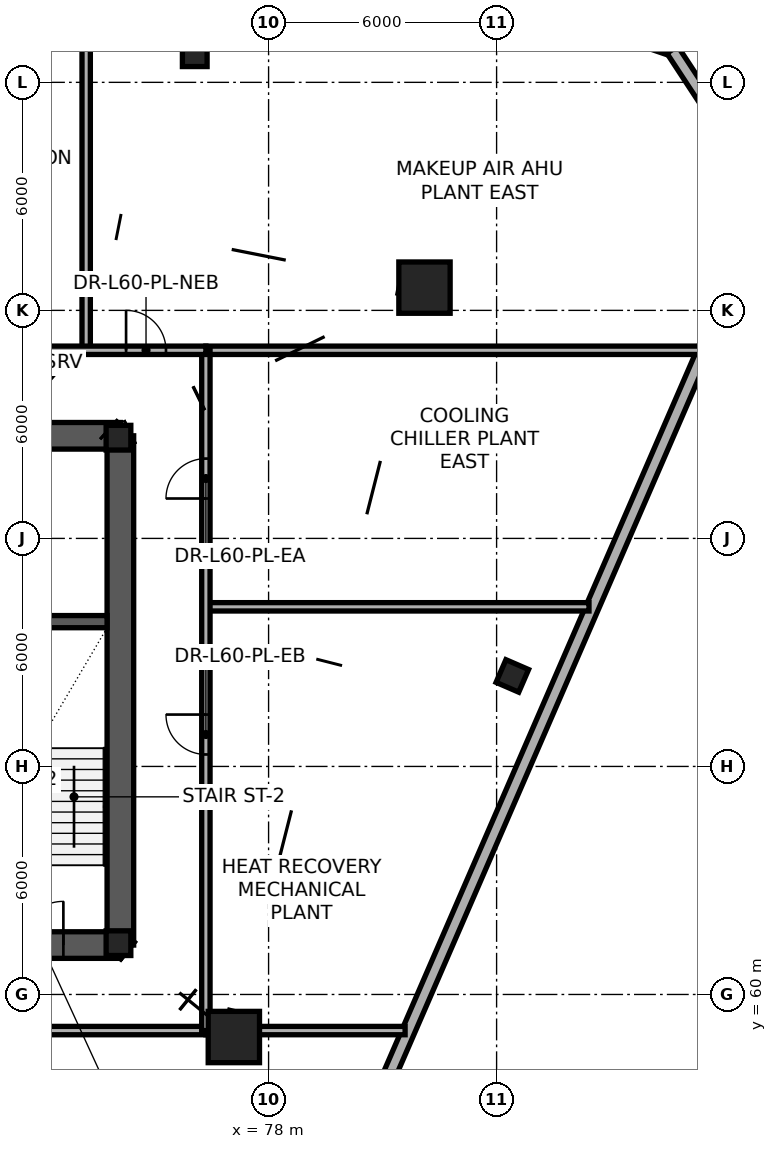
"""IFC4 building model, lengths in metres.
Left out: names, types, materials, properties, quantities, classifications, styles, units other than length and angle.
Written with IfcOpenShell. Run it as: python <this file> out.ifc"""

import sys

from ifc_helpers import new_model, si_unit, direction, frame, frame_2d, origin, origin_2d, place, context, subcontext, project, spatial, rectangle, extrude, element, fill, save


model = new_model("IFC4")
c1 = context("Model", 3, precision=1e-05, world=origin(), true_north=direction((0.0, 1.0)))
c2 = subcontext(c1, "Body", "Model", "MODEL_VIEW")
j1 = project(units=[si_unit("LENGTHUNIT", "METRE"), si_unit("PLANEANGLEUNIT", "RADIAN")], contexts=[c1])
p1 = place(None, origin())
s1 = spatial("IfcSite", under=j1, at=p1, CompositionType="ELEMENT")
p2 = place(p1, origin())
s2 = spatial("IfcBuilding", under=s1, at=p2, CompositionType="ELEMENT")
p3 = place(p2, frame((0.0, 0.0, 227.4)))
s3 = spatial("IfcBuildingStorey", under=s2, at=p3, CompositionType="ELEMENT", Elevation=227.4)
p4 = place(p3, frame((57.9, 61.3, 0.0), z_axis=(0.0, 0.0, 1.0), x_axis=(1.0, 0.0, 0.0)))
e1 = element("IfcWall", 1, at=p4, inside=s3, PredefinedType="SHEAR", context=c2, shape_type="SweptSolid", body=[
    extrude(rectangle(XDim=16.2, YDim=0.7, at=frame_2d((8.1, 0.0))), origin(), (0.0, 0.0, 1.0), 4.2),
])
p5 = place(p4, frame((1.35, 0.0, 0.0)))
e2 = element("IfcOpeningElement", 2, at=p5, cuts=e1, PredefinedType="OPENING", context=c2, shape_type="SweptSolid", body=[
    extrude(rectangle(XDim=1.15, YDim=2.15, at=frame_2d((0.575, 1.075))), frame((0.0, 0.36, 0.0), z_axis=(0.0, -1.0, 0.0), x_axis=(1.0, 0.0, 0.0)), (0.0, 0.0, 1.0), 0.72),
])
p6 = place(p4, frame((6.1, 0.0, 0.0)))
e3 = element("IfcOpeningElement", 3, at=p6, cuts=e1, PredefinedType="OPENING", context=c2, shape_type="SweptSolid", body=[
    extrude(rectangle(XDim=1.6, YDim=2.15, at=frame_2d((0.8, 1.075))), frame((0.0, 0.36, 0.0), z_axis=(0.0, -1.0, 0.0), x_axis=(1.0, 0.0, 0.0)), (0.0, 0.0, 1.0), 0.72),
])
p7 = place(p4, frame((13.55, 0.0, 0.0)))
e4 = element("IfcOpeningElement", 4, at=p7, cuts=e1, PredefinedType="OPENING", context=c2, shape_type="SweptSolid", body=[
    extrude(rectangle(XDim=1.15, YDim=2.15, at=frame_2d((0.575, 1.075))), frame((0.0, 0.36, 0.0), z_axis=(0.0, -1.0, 0.0), x_axis=(1.0, 0.0, 0.0)), (0.0, 0.0, 1.0), 0.72),
])
p8 = place(p3, frame((74.1, 61.3, 0.0), z_axis=(0.0, 0.0, 1.0), x_axis=(0.0, 1.0, 0.0)))
e5 = element("IfcWall", 5, at=p8, inside=s3, PredefinedType="SHEAR", context=c2, shape_type="SweptSolid", body=[
    extrude(rectangle(XDim=13.4, YDim=0.7, at=frame_2d((6.7, 0.0))), origin(), (0.0, 0.0, 1.0), 4.2),
])
p9 = place(p3, frame((74.1, 74.7, 0.0), z_axis=(0.0, 0.0, 1.0), x_axis=(-1.0, 0.0, 0.0)))
e6 = element("IfcWall", 6, at=p9, inside=s3, PredefinedType="SHEAR", context=c2, shape_type="SweptSolid", body=[
    extrude(rectangle(XDim=7.25, YDim=0.7, at=frame_2d((3.625, 0.0))), origin(), (0.0, 0.0, 1.0), 4.2),
])
p10 = place(p3, frame((69.91, 69.81, 0.0), z_axis=(0.0, 0.0, 1.0), x_axis=(1.0, 0.0, 0.0)))
e7 = element("IfcWall", 7, at=p10, inside=s3, PredefinedType="SHEAR", context=c2, shape_type="SweptSolid", body=[
    extrude(rectangle(XDim=3.84, YDim=0.32, at=frame_2d((1.92, 0.0))), origin(), (0.0, 0.0, 1.0), 4.2),
])
for number, where, z_axis, x_axis in (
    (8, (74.05, 61.35, 0.0), (0.0, 0.0, 1.0), (1.0, 0.0, 0.0)),
    (9, (74.05, 74.65, 0.0), (0.0, 0.0, 1.0), (1.0, 0.0, 0.0)),
):
    element("IfcColumn", number, at=place(p3, frame(where, z_axis=z_axis, x_axis=x_axis)), inside=s3, PredefinedType="COLUMN", context=c2, shape_type="SweptSolid", body=[
        extrude(rectangle(XDim=0.65, YDim=0.65, at=origin_2d()), origin(), (0.0, 0.0, 1.0), 4.2),
    ])
for number, where, z_axis, x_axis in (
    (10, (82.102, 78.599, 0.0), (0.0, 0.0, 1.0), (1.0, 0.0, 0.0)),
    (11, (77.086, 58.88, 0.0), (0.0, 0.0, 1.0), (1.0, 0.0, 0.0)),
):
    element("IfcColumn", number, at=place(p3, frame(where, z_axis=z_axis, x_axis=x_axis)), inside=s3, PredefinedType="COLUMN", context=c2, shape_type="SweptSolid", body=[
        extrude(rectangle(XDim=1.35, YDim=1.35, at=origin_2d()), origin(), (0.0, 0.0, 1.0), 4.2),
    ])
p11 = place(p3, frame((84.486, 68.392, 0.003), z_axis=(-0.034093161736, -0.004887074379, 0.999406710417), x_axis=(0.964007058955, -0.263992744095, 0.031594641171)))
e12 = element("IfcColumn", 12, at=p11, inside=s3, PredefinedType="COLUMN", context=c2, shape_type="SweptSolid", body=[
    extrude(rectangle(XDim=0.65, YDim=0.65, at=origin_2d()), origin(), (0.0, 0.0, 1.0), 4.196),
])
p12 = place(p3, frame((76.106, 84.802, 0.003), z_axis=(-0.023327540233, -0.029144881937, 0.999302957928), x_axis=(-0.780716755404, 0.624885067698, 0.0)))
e13 = element("IfcColumn", 13, at=p12, inside=s3, PredefinedType="COLUMN", context=c2, shape_type="SweptSolid", body=[
    extrude(rectangle(XDim=0.65, YDim=0.65, at=origin_2d()), origin(), (0.0, 0.0, 1.0), 4.197),
])
p13 = place(p3, frame((85.435, 85.951, 0.0), z_axis=(0.0, 0.0, 1.0), x_axis=(0.946036065973, -0.324061355115, 0.0)))
e14 = element("IfcWall", 14, at=p13, inside=s3, PredefinedType="STANDARD", context=c2, shape_type="SweptSolid", body=[
    extrude(rectangle(XDim=3.371, YDim=0.34, at=frame_2d((1.685, 0.0))), origin(), (0.0, 0.0, 1.0), 3.95),
])
p14 = place(p3, frame((88.623, 84.859, 0.0), z_axis=(0.0, 0.0, 1.0), x_axis=(0.54858365387, -0.836095673177, 0.0)))
e15 = element("IfcWall", 15, at=p14, inside=s3, PredefinedType="STANDARD", context=c2, shape_type="SweptSolid", body=[
    extrude(rectangle(XDim=3.37, YDim=0.34, at=frame_2d((1.685, 0.0))), origin(), (0.0, 0.0, 1.0), 3.95),
])
p15 = place(p3, frame((90.205, 78.681, 0.0), z_axis=(0.0, 0.0, 1.0), x_axis=(-0.398111937444, -0.917336843948, 0.0)))
e16 = element("IfcWall", 16, at=p15, inside=s3, PredefinedType="STANDARD", context=c2, shape_type="SweptSolid", body=[
    extrude(rectangle(XDim=48.817, YDim=0.34, at=frame_2d((24.408, 0.0))), origin(), (0.0, 0.0, 1.0), 0.85),
])
p16 = place(p3, frame((73.2, 76.95, 0.0), z_axis=(0.0, 0.0, 1.0), x_axis=(0.0, 1.0, 0.0)))
e17 = element("IfcWall", 17, at=p16, inside=s3, PredefinedType="PARTITIONING", context=c2, shape_type="SweptSolid", body=[
    extrude(rectangle(XDim=8.917, YDim=0.22, at=frame_2d((4.458, 0.0))), origin(), (0.0, 0.0, 1.0), 3.15),
])
p17 = place(p3, frame((76.35, 76.95, 0.0), z_axis=(0.0, 0.0, 1.0), x_axis=(1.0, 0.0, 0.0)))
e18 = element("IfcWall", 18, at=p17, inside=s3, PredefinedType="PARTITIONING", context=c2, shape_type="SweptSolid", body=[
    extrude(rectangle(XDim=13.011, YDim=0.22, at=frame_2d((6.505, 0.0))), origin(), (0.0, 0.0, 1.0), 3.15),
])
p18 = place(p3, frame((76.35, 70.2, 0.0), z_axis=(0.0, 0.0, 1.0), x_axis=(1.0, 0.0, 0.0)))
e19 = element("IfcWall", 19, at=p18, inside=s3, PredefinedType="PARTITIONING", context=c2, shape_type="SweptSolid", body=[
    extrude(rectangle(XDim=10.081, YDim=0.22, at=frame_2d((5.041, 0.0))), origin(), (0.0, 0.0, 1.0), 3.15),
])
p19 = place(p3, frame((76.35, 59.05, 0.0), z_axis=(0.0, 0.0, 1.0), x_axis=(1.0, 0.0, 0.0)))
e20 = element("IfcWall", 20, at=p19, inside=s3, PredefinedType="PARTITIONING", context=c2, shape_type="SweptSolid", body=[
    extrude(rectangle(XDim=5.242, YDim=0.22, at=frame_2d((2.621, 0.0))), origin(), (0.0, 0.0, 1.0), 3.15),
])
p20 = place(p3, frame((55.65, 59.05, 0.0), z_axis=(0.0, 0.0, 1.0), x_axis=(1.0, 0.0, 0.0)))
e21 = element("IfcWall", 21, at=p20, inside=s3, PredefinedType="PARTITIONING", context=c2, shape_type="SweptSolid", body=[
    extrude(rectangle(XDim=20.7, YDim=0.22, at=frame_2d((10.35, 0.0))), origin(), (0.0, 0.0, 1.0), 3.38),
])
p21 = place(p20, frame((9.6, 0.0, 0.0)))
e22 = element("IfcOpeningElement", 22, at=p21, cuts=e21, PredefinedType="OPENING", context=c2, shape_type="SweptSolid", body=[
    extrude(rectangle(XDim=1.5, YDim=2.2, at=frame_2d((0.75, 1.1))), frame((0.0, 0.12, 0.0), z_axis=(0.0, -1.0, 0.0), x_axis=(1.0, 0.0, 0.0)), (0.0, 0.0, 1.0), 0.24),
])
p22 = place(p3, frame((76.35, 59.05, 0.0), z_axis=(0.0, 0.0, 1.0), x_axis=(0.0, 1.0, 0.0)))
e23 = element("IfcWall", 23, at=p22, inside=s3, PredefinedType="PARTITIONING", context=c2, shape_type="SweptSolid", body=[
    extrude(rectangle(XDim=17.9, YDim=0.22, at=frame_2d((8.95, 0.0))), origin(), (0.0, 0.0, 1.0), 3.38),
])
p23 = place(p22, frame((7.265, 0.0, 0.0)))
e24 = element("IfcOpeningElement", 24, at=p23, cuts=e23, PredefinedType="OPENING", context=c2, shape_type="SweptSolid", body=[
    extrude(rectangle(XDim=1.05, YDim=2.15, at=frame_2d((0.525, 1.075))), frame((0.0, 0.12, 0.0), z_axis=(0.0, -1.0, 0.0), x_axis=(1.0, 0.0, 0.0)), (0.0, 0.0, 1.0), 0.24),
])
p24 = place(p22, frame((14.0, 0.0, 0.0)))
e25 = element("IfcOpeningElement", 25, at=p24, cuts=e23, PredefinedType="OPENING", context=c2, shape_type="SweptSolid", body=[
    extrude(rectangle(XDim=1.05, YDim=2.15, at=frame_2d((0.525, 1.075))), frame((0.0, 0.12, 0.0), z_axis=(0.0, -1.0, 0.0), x_axis=(1.0, 0.0, 0.0)), (0.0, 0.0, 1.0), 0.24),
])
p25 = place(p3, frame((55.65, 76.95, 0.0), z_axis=(0.0, 0.0, 1.0), x_axis=(1.0, 0.0, 0.0)))
e26 = element("IfcWall", 26, at=p25, inside=s3, PredefinedType="PARTITIONING", context=c2, shape_type="SweptSolid", body=[
    extrude(rectangle(XDim=20.7, YDim=0.22, at=frame_2d((10.35, 0.0))), origin(), (0.0, 0.0, 1.0), 3.38),
])
p26 = place(p25, frame((1.15, 0.0, 0.0)))
e27 = element("IfcOpeningElement", 27, at=p26, cuts=e26, PredefinedType="OPENING", context=c2, shape_type="SweptSolid", body=[
    extrude(rectangle(XDim=1.05, YDim=2.15, at=frame_2d((0.525, 1.075))), frame((0.0, 0.12, 0.0), z_axis=(0.0, -1.0, 0.0), x_axis=(1.0, 0.0, 0.0)), (0.0, 0.0, 1.0), 0.24),
])
p27 = place(p25, frame((6.325, 0.0, 0.0)))
e28 = element("IfcOpeningElement", 28, at=p27, cuts=e26, PredefinedType="OPENING", context=c2, shape_type="SweptSolid", body=[
    extrude(rectangle(XDim=1.05, YDim=2.15, at=frame_2d((0.525, 1.075))), frame((0.0, 0.12, 0.0), z_axis=(0.0, -1.0, 0.0), x_axis=(1.0, 0.0, 0.0)), (0.0, 0.0, 1.0), 0.24),
])
p28 = place(p25, frame((11.602, 0.0, 0.0)))
e29 = element("IfcOpeningElement", 29, at=p28, cuts=e26, PredefinedType="OPENING", context=c2, shape_type="SweptSolid", body=[
    extrude(rectangle(XDim=1.05, YDim=2.15, at=frame_2d((0.525, 1.075))), frame((0.0, 0.12, 0.0), z_axis=(0.0, -1.0, 0.0), x_axis=(1.0, 0.0, 0.0)), (0.0, 0.0, 1.0), 0.24),
])
p29 = place(p25, frame((18.6, 0.0, 0.0)))
e30 = element("IfcOpeningElement", 30, at=p29, cuts=e26, PredefinedType="OPENING", context=c2, shape_type="SweptSolid", body=[
    extrude(rectangle(XDim=1.05, YDim=2.15, at=frame_2d((0.525, 1.075))), frame((0.0, 0.12, 0.0), z_axis=(0.0, -1.0, 0.0), x_axis=(1.0, 0.0, 0.0)), (0.0, 0.0, 1.0), 0.24),
])
p30 = place(p7, origin())
e31 = element("IfcDoor", 31, at=p30, inside=s3, OperationType="SINGLE_SWING_RIGHT", PredefinedType="DOOR", context=c2, shape_type="SweptSolid", body=[
    extrude(rectangle(XDim=1.15, YDim=2.15, at=frame_2d((0.575, 1.075))), frame((0.0, 0.025, 0.0), z_axis=(0.0, -1.0, 0.0), x_axis=(1.0, 0.0, 0.0)), (0.0, 0.0, 1.0), 0.05),
])
fill(e4, e31)
p31 = place(p23, origin())
e32 = element("IfcDoor", 32, at=p31, inside=s3, OperationType="SINGLE_SWING_RIGHT", PredefinedType="DOOR", context=c2, shape_type="SweptSolid", body=[
    extrude(rectangle(XDim=1.05, YDim=2.15, at=frame_2d((0.525, 1.075))), frame((0.0, 0.025, 0.0), z_axis=(0.0, -1.0, 0.0), x_axis=(1.0, 0.0, 0.0)), (0.0, 0.0, 1.0), 0.05),
])
fill(e24, e32)
p32 = place(p24, origin())
e33 = element("IfcDoor", 33, at=p32, inside=s3, OperationType="SINGLE_SWING_LEFT", PredefinedType="DOOR", context=c2, shape_type="SweptSolid", body=[
    extrude(rectangle(XDim=1.05, YDim=2.15, at=frame_2d((0.525, 1.075))), frame((0.0, 0.025, 0.0), z_axis=(0.0, -1.0, 0.0), x_axis=(1.0, 0.0, 0.0)), (0.0, 0.0, 1.0), 0.05),
])
fill(e25, e33)
p33 = place(p29, origin())
e34 = element("IfcDoor", 34, at=p33, inside=s3, OperationType="SINGLE_SWING_LEFT", PredefinedType="DOOR", context=c2, shape_type="SweptSolid", body=[
    extrude(rectangle(XDim=1.05, YDim=2.15, at=frame_2d((0.525, 1.075))), frame((0.0, 0.025, 0.0), z_axis=(0.0, -1.0, 0.0), x_axis=(1.0, 0.0, 0.0)), (0.0, 0.0, 1.0), 0.05),
])
fill(e30, e34)
save(model, sys.argv[1])
